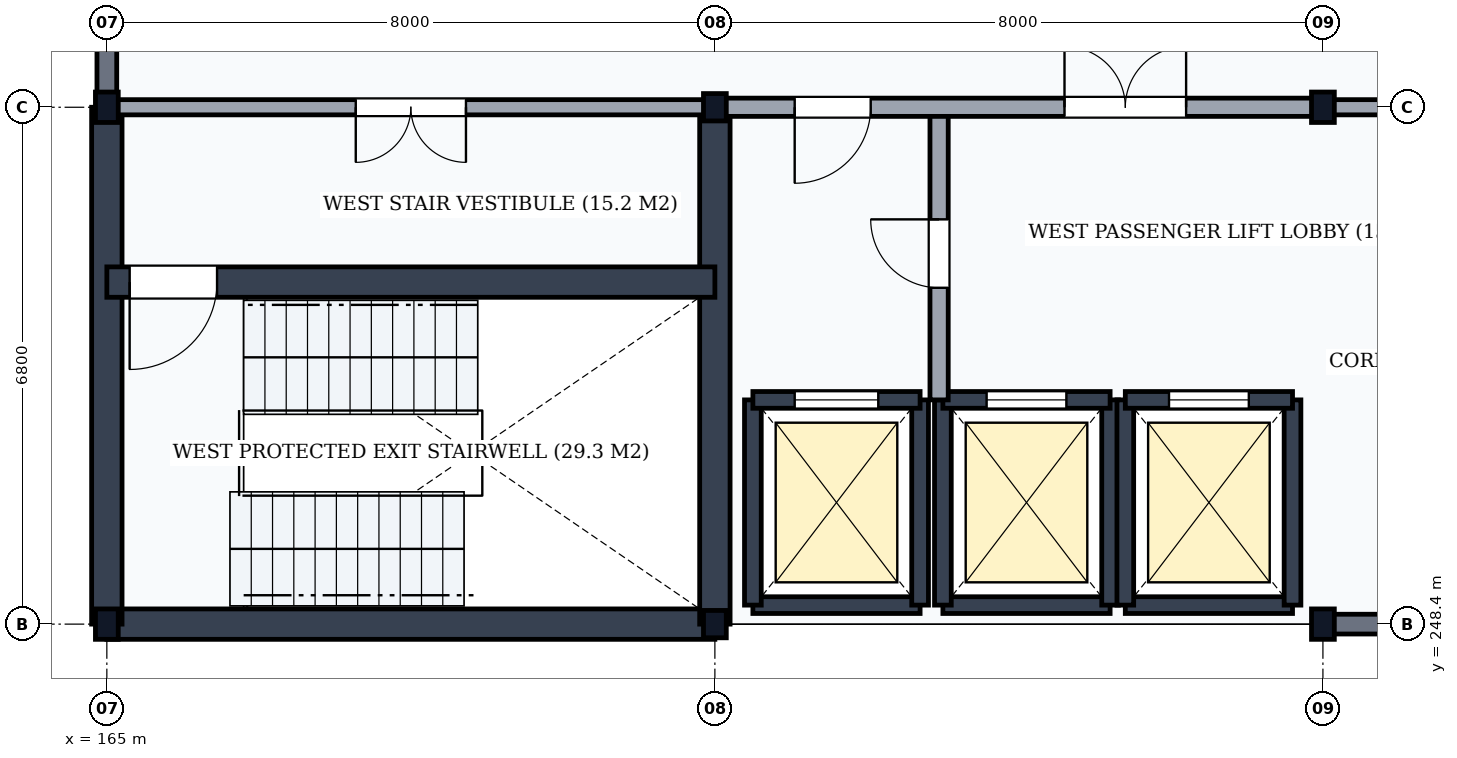
"""IFC4 building model, lengths in metres.
Left out: names, types, materials, properties, quantities, classifications, styles, units other than length and angle.
Written with IfcOpenShell. Run it as: python <this file> out.ifc"""

import sys

from ifc_helpers import new_model, si_unit, direction, frame, frame_2d, origin, origin_2d, place, context, subcontext, project, spatial, rectangle, i_section, extrude, element, fill, save


model = new_model("IFC4")
c1 = context("Model", 3, precision=1e-05, world=origin(), true_north=direction((0.0, 1.0)))
c2 = subcontext(c1, "Body", "Model", "MODEL_VIEW")
j1 = project(units=[si_unit("LENGTHUNIT", "METRE"), si_unit("PLANEANGLEUNIT", "RADIAN")], contexts=[c1])
p1 = place(None, origin())
s1 = spatial("IfcSite", under=j1, at=p1, CompositionType="ELEMENT")
p2 = place(p1, origin())
s2 = spatial("IfcBuilding", under=s1, at=p2, CompositionType="ELEMENT")
p3 = place(p2, frame((0.0, 0.0, 60.0)))
s3 = spatial("IfcBuildingStorey", under=s2, at=p3, CompositionType="ELEMENT", Elevation=60.0)
for number, where, z_axis, x_axis in (
    (1, (165.0, 248.4, 0.0), (0.0, 0.0, 1.0), (1.0, 0.0, 0.0)),
    (2, (165.0, 255.2, 0.0), (0.0, 0.0, 1.0), (1.0, 0.0, 0.0)),
):
    element("IfcColumn", number, at=place(p3, frame(where, z_axis=z_axis, x_axis=x_axis)), inside=s3, PredefinedType="COLUMN", context=c2, shape_type="SweptSolid", body=[
        extrude(i_section(OverallWidth=0.3, OverallDepth=0.4, WebThickness=0.013, FlangeThickness=0.024, FilletRadius=0.027, at=origin_2d()), origin(), (0.0, 0.0, 1.0), 3.9),
    ])
for number, where, z_axis, x_axis in (
    (3, (173.0, 248.4, 0.0), (0.0, 0.0, 1.0), (1.0, 0.0, 0.0)),
    (4, (173.0, 255.2, 0.0), (0.0, 0.0, 1.0), (1.0, 0.0, 0.0)),
):
    element("IfcColumn", number, at=place(p3, frame(where, z_axis=z_axis, x_axis=x_axis)), inside=s3, PredefinedType="COLUMN", context=c2, shape_type="SweptSolid", body=[
        extrude(i_section(OverallWidth=0.3, OverallDepth=0.36, WebThickness=0.012, FlangeThickness=0.022, FilletRadius=0.027, at=origin_2d()), origin(), (0.0, 0.0, 1.0), 3.9),
    ])
for number, where, z_axis, x_axis in (
    (5, (181.0, 248.4, 0.0), (0.0, 0.0, 1.0), (1.0, 0.0, 0.0)),
    (6, (181.0, 255.2, 0.0), (0.0, 0.0, 1.0), (1.0, 0.0, 0.0)),
):
    element("IfcColumn", number, at=place(p3, frame(where, z_axis=z_axis, x_axis=x_axis)), inside=s3, PredefinedType="COLUMN", context=c2, shape_type="SweptSolid", body=[
        extrude(i_section(OverallWidth=0.3, OverallDepth=0.4, WebThickness=0.013, FlangeThickness=0.024, FilletRadius=0.027, at=origin_2d()), origin(), (0.0, 0.0, 1.0), 3.9),
    ])
p4 = place(p3, frame((181.006, 248.4, 0.0), z_axis=(0.0, 0.0, 1.0), x_axis=(1.0, 0.0, 0.0)))
e7 = element("IfcWall", 7, at=p4, inside=s3, PredefinedType="SOLIDWALL", context=c2, shape_type="SweptSolid", body=[
    extrude(rectangle(XDim=7.988, YDim=0.26, at=frame_2d((3.994, 0.0))), origin(), (0.0, 0.0, 1.0), 3.268),
])
p5 = place(p4, frame((3.394, 0.0, 0.95)))
e8 = element("IfcOpeningElement", 8, at=p5, cuts=e7, PredefinedType="OPENING", context=c2, shape_type="SweptSolid", body=[
    extrude(rectangle(XDim=0.6, YDim=1.5, at=frame_2d((0.3, 0.75))), frame((0.0, 0.145, 0.0), z_axis=(0.0, -1.0, 0.0), x_axis=(1.0, 0.0, 0.0)), (0.0, 0.0, 1.0), 0.29),
])
p6 = place(p3, frame((165.0, 255.206, 0.0), z_axis=(0.0, 0.0, 1.0), x_axis=(0.0, 1.0, 0.0)))
e9 = element("IfcWall", 9, at=p6, inside=s3, PredefinedType="SOLIDWALL", context=c2, shape_type="SweptSolid", body=[
    extrude(rectangle(XDim=7.588, YDim=0.26, at=frame_2d((3.794, 0.0))), origin(), (0.0, 0.0, 1.0), 3.308),
])
p7 = place(p3, frame((165.0, 248.4, 0.0), z_axis=(0.0, 0.0, 1.0), x_axis=(1.0, 0.0, 0.0)))
e10 = element("IfcWall", 10, at=p7, inside=s3, PredefinedType="SHEAR", context=c2, shape_type="SweptSolid", body=[
    extrude(rectangle(XDim=8.0, YDim=0.4, at=frame_2d((4.0, 0.0))), origin(), (0.0, 0.0, 1.0), 3.58),
])
for number, where, z_axis, x_axis in (
    (11, (165.0, 248.4, 0.0), (0.0, 0.0, 1.0), (0.0, 1.0, 0.0)),
    (12, (173.0, 248.4, 0.0), (0.0, 0.0, 1.0), (0.0, 1.0, 0.0)),
):
    element("IfcWall", number, at=place(p3, frame(where, z_axis=z_axis, x_axis=x_axis)), inside=s3, PredefinedType="SHEAR", context=c2, shape_type="SweptSolid", body=[
        extrude(rectangle(XDim=6.8, YDim=0.4, at=frame_2d((3.4, 0.0))), origin(), (0.0, 0.0, 1.0), 3.58),
    ])
p8 = place(p3, frame((165.0, 252.9, 0.0), z_axis=(0.0, 0.0, 1.0), x_axis=(1.0, 0.0, 0.0)))
e13 = element("IfcWall", 13, at=p8, inside=s3, PredefinedType="SHEAR", context=c2, shape_type="SweptSolid", body=[
    extrude(rectangle(XDim=8.0, YDim=0.4, at=frame_2d((4.0, 0.0))), origin(), (0.0, 0.0, 1.0), 3.58),
])
p9 = place(p8, frame((0.3, 0.0, 0.0)))
e14 = element("IfcOpeningElement", 14, at=p9, cuts=e13, PredefinedType="OPENING", context=c2, shape_type="SweptSolid", body=[
    extrude(rectangle(XDim=1.15, YDim=2.15, at=frame_2d((0.575, 1.075))), frame((0.0, 0.215, 0.0), z_axis=(0.0, -1.0, 0.0), x_axis=(1.0, 0.0, 0.0)), (0.0, 0.0, 1.0), 0.43),
])
p10 = place(p3, frame((165.0, 255.2, 0.0), z_axis=(0.0, 0.0, 1.0), x_axis=(1.0, 0.0, 0.0)))
e15 = element("IfcWall", 15, at=p10, inside=s3, PredefinedType="PARTITIONING", context=c2, shape_type="SweptSolid", body=[
    extrude(rectangle(XDim=8.0, YDim=0.2, at=frame_2d((4.0, 0.0))), origin(), (0.0, 0.0, 1.0), 3.028),
])
p11 = place(p10, frame((3.275, 0.0, 0.0)))
e16 = element("IfcOpeningElement", 16, at=p11, cuts=e15, PredefinedType="OPENING", context=c2, shape_type="SweptSolid", body=[
    extrude(rectangle(XDim=1.45, YDim=2.2, at=frame_2d((0.725, 1.1))), frame((0.0, 0.115, 0.0), z_axis=(0.0, -1.0, 0.0), x_axis=(1.0, 0.0, 0.0)), (0.0, 0.0, 1.0), 0.23),
])
p12 = place(p3, frame((173.5, 248.65, 0.0), z_axis=(0.0, 0.0, 1.0), x_axis=(1.0, 0.0, 0.0)))
e17 = element("IfcWall", 17, at=p12, inside=s3, PredefinedType="SHEAR", context=c2, shape_type="SweptSolid", body=[
    extrude(rectangle(XDim=2.2, YDim=0.22, at=frame_2d((1.1, 0.0))), origin(), (0.0, 0.0, 1.0), 3.58),
])
for number, where, z_axis, x_axis in (
    (18, (173.5, 248.65, 0.0), (0.0, 0.0, 1.0), (0.0, 1.0, 0.0)),
    (19, (175.7, 248.65, 0.0), (0.0, 0.0, 1.0), (0.0, 1.0, 0.0)),
):
    element("IfcWall", number, at=place(p3, frame(where, z_axis=z_axis, x_axis=x_axis)), inside=s3, PredefinedType="SHEAR", context=c2, shape_type="SweptSolid", body=[
        extrude(rectangle(XDim=2.7, YDim=0.22, at=frame_2d((1.35, 0.0))), origin(), (0.0, 0.0, 1.0), 3.58),
    ])
p13 = place(p3, frame((173.5, 251.35, 0.0), z_axis=(0.0, 0.0, 1.0), x_axis=(1.0, 0.0, 0.0)))
e20 = element("IfcWall", 20, at=p13, inside=s3, PredefinedType="SHEAR", context=c2, shape_type="SweptSolid", body=[
    extrude(rectangle(XDim=2.2, YDim=0.22, at=frame_2d((1.1, 0.0))), origin(), (0.0, 0.0, 1.0), 3.58),
])
p14 = place(p13, frame((0.55, 0.0, 0.0)))
e21 = element("IfcOpeningElement", 21, at=p14, cuts=e20, PredefinedType="OPENING", context=c2, shape_type="SweptSolid", body=[
    extrude(rectangle(XDim=1.1, YDim=2.15, at=frame_2d((0.55, 1.075))), frame((0.0, 0.125, 0.0), z_axis=(0.0, -1.0, 0.0), x_axis=(1.0, 0.0, 0.0)), (0.0, 0.0, 1.0), 0.25),
])
p15 = place(p3, frame((176.0, 248.65, 0.0), z_axis=(0.0, 0.0, 1.0), x_axis=(1.0, 0.0, 0.0)))
e22 = element("IfcWall", 22, at=p15, inside=s3, PredefinedType="SHEAR", context=c2, shape_type="SweptSolid", body=[
    extrude(rectangle(XDim=2.2, YDim=0.22, at=frame_2d((1.1, 0.0))), origin(), (0.0, 0.0, 1.0), 3.58),
])
for number, where, z_axis, x_axis in (
    (23, (176.0, 248.65, 0.0), (0.0, 0.0, 1.0), (0.0, 1.0, 0.0)),
    (24, (178.2, 248.65, 0.0), (0.0, 0.0, 1.0), (0.0, 1.0, 0.0)),
):
    element("IfcWall", number, at=place(p3, frame(where, z_axis=z_axis, x_axis=x_axis)), inside=s3, PredefinedType="SHEAR", context=c2, shape_type="SweptSolid", body=[
        extrude(rectangle(XDim=2.7, YDim=0.22, at=frame_2d((1.35, 0.0))), origin(), (0.0, 0.0, 1.0), 3.58),
    ])
p16 = place(p3, frame((176.0, 251.35, 0.0), z_axis=(0.0, 0.0, 1.0), x_axis=(1.0, 0.0, 0.0)))
e25 = element("IfcWall", 25, at=p16, inside=s3, PredefinedType="SHEAR", context=c2, shape_type="SweptSolid", body=[
    extrude(rectangle(XDim=2.2, YDim=0.22, at=frame_2d((1.1, 0.0))), origin(), (0.0, 0.0, 1.0), 3.58),
])
p17 = place(p16, frame((0.575, 0.0, 0.0)))
e26 = element("IfcOpeningElement", 26, at=p17, cuts=e25, PredefinedType="OPENING", context=c2, shape_type="SweptSolid", body=[
    extrude(rectangle(XDim=1.05, YDim=2.15, at=frame_2d((0.525, 1.075))), frame((0.0, 0.125, 0.0), z_axis=(0.0, -1.0, 0.0), x_axis=(1.0, 0.0, 0.0)), (0.0, 0.0, 1.0), 0.25),
])
p18 = place(p3, frame((178.4, 248.65, 0.0), z_axis=(0.0, 0.0, 1.0), x_axis=(1.0, 0.0, 0.0)))
e27 = element("IfcWall", 27, at=p18, inside=s3, PredefinedType="SHEAR", context=c2, shape_type="SweptSolid", body=[
    extrude(rectangle(XDim=2.2, YDim=0.22, at=frame_2d((1.1, 0.0))), origin(), (0.0, 0.0, 1.0), 3.58),
])
for number, where, z_axis, x_axis in (
    (28, (178.4, 248.65, 0.0), (0.0, 0.0, 1.0), (0.0, 1.0, 0.0)),
    (29, (180.6, 248.65, 0.0), (0.0, 0.0, 1.0), (0.0, 1.0, 0.0)),
):
    element("IfcWall", number, at=place(p3, frame(where, z_axis=z_axis, x_axis=x_axis)), inside=s3, PredefinedType="SHEAR", context=c2, shape_type="SweptSolid", body=[
        extrude(rectangle(XDim=2.7, YDim=0.22, at=frame_2d((1.35, 0.0))), origin(), (0.0, 0.0, 1.0), 3.58),
    ])
p19 = place(p3, frame((178.4, 251.35, 0.0), z_axis=(0.0, 0.0, 1.0), x_axis=(1.0, 0.0, 0.0)))
e30 = element("IfcWall", 30, at=p19, inside=s3, PredefinedType="SHEAR", context=c2, shape_type="SweptSolid", body=[
    extrude(rectangle(XDim=2.2, YDim=0.22, at=frame_2d((1.1, 0.0))), origin(), (0.0, 0.0, 1.0), 3.58),
])
p20 = place(p19, frame((0.575, 0.0, 0.0)))
e31 = element("IfcOpeningElement", 31, at=p20, cuts=e30, PredefinedType="OPENING", context=c2, shape_type="SweptSolid", body=[
    extrude(rectangle(XDim=1.05, YDim=2.15, at=frame_2d((0.525, 1.075))), frame((0.0, 0.125, 0.0), z_axis=(0.0, -1.0, 0.0), x_axis=(1.0, 0.0, 0.0)), (0.0, 0.0, 1.0), 0.25),
])
p21 = place(p3, frame((175.95, 251.35, 0.0), z_axis=(0.0, 0.0, 1.0), x_axis=(0.0, 1.0, 0.0)))
e32 = element("IfcWall", 32, at=p21, inside=s3, PredefinedType="PARTITIONING", context=c2, shape_type="SweptSolid", body=[
    extrude(rectangle(XDim=3.85, YDim=0.24, at=frame_2d((1.925, 0.0))), origin(), (0.0, 0.0, 1.0), 3.58),
])
p22 = place(p21, frame((1.475, 0.0, 0.0)))
e33 = element("IfcOpeningElement", 33, at=p22, cuts=e32, PredefinedType="OPENING", context=c2, shape_type="SweptSolid", body=[
    extrude(rectangle(XDim=0.9, YDim=2.1, at=frame_2d((0.45, 1.05))), frame((0.0, 0.135, 0.0), z_axis=(0.0, -1.0, 0.0), x_axis=(1.0, 0.0, 0.0)), (0.0, 0.0, 1.0), 0.27),
])
p23 = place(p3, frame((173.0, 255.2, 0.0), z_axis=(0.0, 0.0, 1.0), x_axis=(1.0, 0.0, 0.0)))
e34 = element("IfcWall", 34, at=p23, inside=s3, PredefinedType="PARTITIONING", context=c2, shape_type="SweptSolid", body=[
    extrude(rectangle(XDim=8.0, YDim=0.24, at=frame_2d((4.0, 0.0))), origin(), (0.0, 0.0, 1.0), 3.028),
])
p24 = place(p23, frame((1.05, 0.0, 0.0)))
e35 = element("IfcOpeningElement", 35, at=p24, cuts=e34, PredefinedType="OPENING", context=c2, shape_type="SweptSolid", body=[
    extrude(rectangle(XDim=1.0, YDim=2.1, at=frame_2d((0.5, 1.05))), frame((0.0, 0.135, 0.0), z_axis=(0.0, -1.0, 0.0), x_axis=(1.0, 0.0, 0.0)), (0.0, 0.0, 1.0), 0.27),
])
p25 = place(p23, frame((4.6, 0.0, 0.0)))
e36 = element("IfcOpeningElement", 36, at=p25, cuts=e34, PredefinedType="OPENING", context=c2, shape_type="SweptSolid", body=[
    extrude(rectangle(XDim=1.6, YDim=2.25, at=frame_2d((0.8, 1.125))), frame((0.0, 0.135, 0.0), z_axis=(0.0, -1.0, 0.0), x_axis=(1.0, 0.0, 0.0)), (0.0, 0.0, 1.0), 0.27),
])
p26 = place(p3, frame((181.0, 255.2, 0.0), z_axis=(0.0, 0.0, 1.0), x_axis=(1.0, 0.0, 0.0)))
e37 = element("IfcWall", 37, at=p26, inside=s3, PredefinedType="PARTITIONING", context=c2, shape_type="SweptSolid", body=[
    extrude(rectangle(XDim=8.0, YDim=0.2, at=frame_2d((4.0, 0.0))), origin(), (0.0, 0.0, 1.0), 3.028),
])
p27 = place(p26, frame((0.85, 0.0, 0.0)))
e38 = element("IfcOpeningElement", 38, at=p27, cuts=e37, PredefinedType="OPENING", context=c2, shape_type="SweptSolid", body=[
    extrude(rectangle(XDim=0.9, YDim=2.1, at=frame_2d((0.45, 1.05))), frame((0.0, 0.115, 0.0), z_axis=(0.0, -1.0, 0.0), x_axis=(1.0, 0.0, 0.0)), (0.0, 0.0, 1.0), 0.23),
])
p28 = place(p26, frame((3.25, 0.0, 0.0)))
e39 = element("IfcOpeningElement", 39, at=p28, cuts=e37, PredefinedType="OPENING", context=c2, shape_type="SweptSolid", body=[
    extrude(rectangle(XDim=0.9, YDim=2.1, at=frame_2d((0.45, 1.05))), frame((0.0, 0.115, 0.0), z_axis=(0.0, -1.0, 0.0), x_axis=(1.0, 0.0, 0.0)), (0.0, 0.0, 1.0), 0.23),
])
p29 = place(p26, frame((5.075, 0.0, 0.0)))
e40 = element("IfcOpeningElement", 40, at=p29, cuts=e37, PredefinedType="OPENING", context=c2, shape_type="SweptSolid", body=[
    extrude(rectangle(XDim=0.95, YDim=2.1, at=frame_2d((0.475, 1.05))), frame((0.0, 0.115, 0.0), z_axis=(0.0, -1.0, 0.0), x_axis=(1.0, 0.0, 0.0)), (0.0, 0.0, 1.0), 0.23),
])
p30 = place(p26, frame((6.5, 0.0, 0.0)))
e41 = element("IfcOpeningElement", 41, at=p30, cuts=e37, PredefinedType="OPENING", context=c2, shape_type="SweptSolid", body=[
    extrude(rectangle(XDim=0.85, YDim=2.1, at=frame_2d((0.425, 1.05))), frame((0.0, 0.115, 0.0), z_axis=(0.0, -1.0, 0.0), x_axis=(1.0, 0.0, 0.0)), (0.0, 0.0, 1.0), 0.23),
])
p31 = place(p9, frame((1.15, 0.0, 0.0), z_axis=(0.0, 0.0, 1.0), x_axis=(-1.0, 0.0, 0.0)))
e42 = element("IfcDoor", 42, at=p31, inside=s3, OperationType="SINGLE_SWING_RIGHT", PredefinedType="DOOR", context=c2, shape_type="SweptSolid", body=[
    extrude(rectangle(XDim=1.15, YDim=2.15, at=frame_2d((0.575, 1.075))), frame((0.0, 0.025, 0.0), z_axis=(0.0, -1.0, 0.0), x_axis=(1.0, 0.0, 0.0)), (0.0, 0.0, 1.0), 0.05),
])
fill(e14, e42)
p32 = place(p11, frame((1.45, 0.0, 0.0), z_axis=(0.0, 0.0, 1.0), x_axis=(-1.0, 0.0, 0.0)))
e43 = element("IfcDoor", 43, at=p32, inside=s3, OperationType="DOUBLE_DOOR_SINGLE_SWING", PredefinedType="DOOR", context=c2, shape_type="SweptSolid", body=[
    extrude(rectangle(XDim=1.45, YDim=2.2, at=frame_2d((0.725, 1.1))), frame((0.0, 0.025, 0.0), z_axis=(0.0, -1.0, 0.0), x_axis=(1.0, 0.0, 0.0)), (0.0, 0.0, 1.0), 0.05),
])
fill(e16, e43)
p33 = place(p14, origin())
e44 = element("IfcDoor", 44, at=p33, inside=s3, OperationType="DOUBLE_DOOR_SLIDING", PredefinedType="USERDEFINED", context=c2, shape_type="SweptSolid", body=[
    extrude(rectangle(XDim=1.1, YDim=2.15, at=frame_2d((0.55, 1.075))), frame((0.0, 0.025, 0.0), z_axis=(0.0, -1.0, 0.0), x_axis=(1.0, 0.0, 0.0)), (0.0, 0.0, 1.0), 0.05),
])
fill(e21, e44)
p34 = place(p17, origin())
e45 = element("IfcDoor", 45, at=p34, inside=s3, OperationType="DOUBLE_DOOR_SLIDING", PredefinedType="USERDEFINED", context=c2, shape_type="SweptSolid", body=[
    extrude(rectangle(XDim=1.05, YDim=2.15, at=frame_2d((0.525, 1.075))), frame((0.0, 0.025, 0.0), z_axis=(0.0, -1.0, 0.0), x_axis=(1.0, 0.0, 0.0)), (0.0, 0.0, 1.0), 0.05),
])
fill(e26, e45)
p35 = place(p20, origin())
e46 = element("IfcDoor", 46, at=p35, inside=s3, OperationType="DOUBLE_DOOR_SLIDING", PredefinedType="USERDEFINED", context=c2, shape_type="SweptSolid", body=[
    extrude(rectangle(XDim=1.05, YDim=2.15, at=frame_2d((0.525, 1.075))), frame((0.0, 0.025, 0.0), z_axis=(0.0, -1.0, 0.0), x_axis=(1.0, 0.0, 0.0)), (0.0, 0.0, 1.0), 0.05),
])
fill(e31, e46)
p36 = place(p22, frame((0.9, 0.0, 0.0), z_axis=(0.0, 0.0, 1.0), x_axis=(-1.0, 0.0, 0.0)))
e47 = element("IfcDoor", 47, at=p36, inside=s3, OperationType="SINGLE_SWING_LEFT", PredefinedType="DOOR", context=c2, shape_type="SweptSolid", body=[
    extrude(rectangle(XDim=0.9, YDim=2.1, at=frame_2d((0.45, 1.05))), frame((0.0, 0.025, 0.0), z_axis=(0.0, -1.0, 0.0), x_axis=(1.0, 0.0, 0.0)), (0.0, 0.0, 1.0), 0.05),
])
fill(e33, e47)
p37 = place(p24, frame((1.0, 0.0, 0.0), z_axis=(0.0, 0.0, 1.0), x_axis=(-1.0, 0.0, 0.0)))
e48 = element("IfcDoor", 48, at=p37, inside=s3, OperationType="SINGLE_SWING_RIGHT", PredefinedType="DOOR", context=c2, shape_type="SweptSolid", body=[
    extrude(rectangle(XDim=1.0, YDim=2.1, at=frame_2d((0.5, 1.05))), frame((0.0, 0.025, 0.0), z_axis=(0.0, -1.0, 0.0), x_axis=(1.0, 0.0, 0.0)), (0.0, 0.0, 1.0), 0.05),
])
fill(e35, e48)
p38 = place(p25, origin())
e49 = element("IfcDoor", 49, at=p38, inside=s3, OperationType="DOUBLE_DOOR_SINGLE_SWING", PredefinedType="DOOR", context=c2, shape_type="SweptSolid", body=[
    extrude(rectangle(XDim=1.6, YDim=2.25, at=frame_2d((0.8, 1.125))), frame((0.0, 0.025, 0.0), z_axis=(0.0, -1.0, 0.0), x_axis=(1.0, 0.0, 0.0)), (0.0, 0.0, 1.0), 0.05),
])
fill(e36, e49)
save(model, sys.argv[1])
